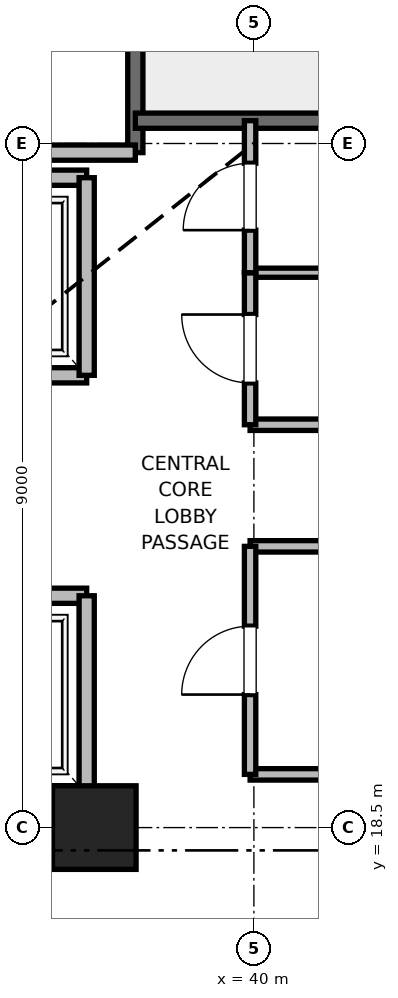
"""IFC4 building model, lengths in metres.
Left out: names, types, materials, properties, quantities, classifications, styles, units other than length and angle.
Written with IfcOpenShell. Run it as: python <this file> out.ifc"""

import sys

from ifc_helpers import new_model, si_unit, direction, frame, frame_2d, origin, origin_2d, place, context, subcontext, project, spatial, rectangle, extrude, element, fill, save


model = new_model("IFC4")
c1 = context("Model", 3, precision=1e-05, world=origin(), true_north=direction((0.0, 1.0)))
c2 = subcontext(c1, "Body", "Model", "MODEL_VIEW")
j1 = project(units=[si_unit("LENGTHUNIT", "METRE"), si_unit("PLANEANGLEUNIT", "RADIAN")], contexts=[c1])
p1 = place(None, origin())
s1 = spatial("IfcSite", under=j1, at=p1, CompositionType="ELEMENT")
p2 = place(p1, origin())
s2 = spatial("IfcBuilding", under=s1, at=p2, CompositionType="ELEMENT")
p3 = place(p2, frame((0.0, 0.0, 107.6)))
s3 = spatial("IfcBuildingStorey", under=s2, at=p3, CompositionType="ELEMENT", Elevation=107.6)
p4 = place(p3, frame((37.9, 18.5, 0.0), z_axis=(0.0, 0.0, 1.0), x_axis=(1.0, 0.0, 0.0)))
e1 = element("IfcColumn", 1, at=p4, inside=s3, PredefinedType="PILASTER", context=c2, shape_type="SweptSolid", body=[
    extrude(rectangle(XDim=1.1, YDim=1.1, at=origin_2d()), origin(), (0.0, 0.0, 1.0), 5.4),
])
p5 = place(p3, frame((29.0, 18.5, 0.0), z_axis=(0.0, 0.0, 1.0), x_axis=(1.0, 0.0, 0.0)))
e2 = element("IfcWall", 2, at=p5, inside=s3, PredefinedType="SHEAR", context=c2, shape_type="SweptSolid", body=[
    extrude(rectangle(XDim=9.2, YDim=0.65, at=frame_2d((4.6, 0.0))), origin(), (0.0, 0.0, 1.0), 5.1),
])
p6 = place(p3, frame((38.44, 27.38, 0.0), z_axis=(0.0, 0.0, 1.0), x_axis=(0.0, 1.0, 0.0)))
e3 = element("IfcWall", 3, at=p6, inside=s3, PredefinedType="SOLIDWALL", context=c2, shape_type="SweptSolid", body=[
    extrude(rectangle(XDim=8.87, YDim=0.2, at=frame_2d((4.435, 0.0))), origin(), (0.0, 0.0, 1.0), 5.1),
])
p7 = place(p3, frame((38.44, 27.8, 0.0), z_axis=(0.0, 0.0, 1.0), x_axis=(1.0, 0.0, 0.0)))
e4 = element("IfcWall", 4, at=p7, inside=s3, PredefinedType="SOLIDWALL", context=c2, shape_type="SweptSolid", body=[
    extrude(rectangle(XDim=3.32, YDim=0.2, at=frame_2d((1.66, 0.0))), origin(), (0.0, 0.0, 1.0), 5.1),
])
p8 = place(p3, frame((32.82, 27.38, 0.0), z_axis=(0.0, 0.0, 1.0), x_axis=(1.0, 0.0, 0.0)))
e5 = element("IfcWall", 5, at=p8, inside=s3, PredefinedType="PARTITIONING", context=c2, shape_type="SweptSolid", body=[
    extrude(rectangle(XDim=5.62, YDim=0.2, at=frame_2d((2.81, 0.0))), origin(), (0.0, 0.0, 1.0), 5.1),
])
p9 = place(p3, frame((35.5, 18.95, 0.0), z_axis=(0.0, 0.0, 1.0), x_axis=(1.0, 0.0, 0.0)))
e6 = element("IfcWall", 6, at=p9, inside=s3, PredefinedType="SOLIDWALL", context=c2, shape_type="SweptSolid", body=[
    extrude(rectangle(XDim=2.3, YDim=0.2, at=frame_2d((1.15, 0.0))), origin(), (0.0, 0.0, 1.0), 3.88),
])
p10 = place(p3, frame((37.8, 21.55, 0.0), z_axis=(0.0, 0.0, 1.0), x_axis=(-1.0, 0.0, 0.0)))
e7 = element("IfcWall", 7, at=p10, inside=s3, PredefinedType="SOLIDWALL", context=c2, shape_type="SweptSolid", body=[
    extrude(rectangle(XDim=2.3, YDim=0.2, at=frame_2d((1.15, 0.0))), origin(), (0.0, 0.0, 1.0), 5.1),
])
p11 = place(p10, frame((0.6, 0.0, 0.0)))
e8 = element("IfcOpeningElement", 8, at=p11, cuts=e7, PredefinedType="OPENING", context=c2, shape_type="SweptSolid", body=[
    extrude(rectangle(XDim=1.1, YDim=2.2, at=frame_2d((0.55, 1.1))), frame((0.0, 0.1, 0.0), z_axis=(0.0, -1.0, 0.0), x_axis=(1.0, 0.0, 0.0)), (0.0, 0.0, 1.0), 0.2),
])
p12 = place(p3, frame((37.8, 18.95, 0.0), z_axis=(0.0, 0.0, 1.0), x_axis=(0.0, 1.0, 0.0)))
e9 = element("IfcWall", 9, at=p12, inside=s3, PredefinedType="SOLIDWALL", context=c2, shape_type="SweptSolid", body=[
    extrude(rectangle(XDim=2.6, YDim=0.2, at=frame_2d((1.3, 0.0))), origin(), (0.0, 0.0, 1.0), 3.88),
])
p13 = place(p3, frame((35.5, 24.45, 0.0), z_axis=(0.0, 0.0, 1.0), x_axis=(1.0, 0.0, 0.0)))
e10 = element("IfcWall", 10, at=p13, inside=s3, PredefinedType="SOLIDWALL", context=c2, shape_type="SweptSolid", body=[
    extrude(rectangle(XDim=2.3, YDim=0.2, at=frame_2d((1.15, 0.0))), origin(), (0.0, 0.0, 1.0), 5.1),
])
p14 = place(p13, frame((0.6, 0.0, 0.0)))
e11 = element("IfcOpeningElement", 11, at=p14, cuts=e10, PredefinedType="OPENING", context=c2, shape_type="SweptSolid", body=[
    extrude(rectangle(XDim=1.1, YDim=2.2, at=frame_2d((0.55, 1.1))), frame((0.0, 0.1, 0.0), z_axis=(0.0, -1.0, 0.0), x_axis=(1.0, 0.0, 0.0)), (0.0, 0.0, 1.0), 0.2),
])
p15 = place(p3, frame((37.8, 27.05, 0.0), z_axis=(0.0, 0.0, 1.0), x_axis=(-1.0, 0.0, 0.0)))
e12 = element("IfcWall", 12, at=p15, inside=s3, PredefinedType="SOLIDWALL", context=c2, shape_type="SweptSolid", body=[
    extrude(rectangle(XDim=2.3, YDim=0.2, at=frame_2d((1.15, 0.0))), origin(), (0.0, 0.0, 1.0), 5.1),
])
p16 = place(p3, frame((37.8, 24.45, 0.0), z_axis=(0.0, 0.0, 1.0), x_axis=(0.0, 1.0, 0.0)))
e13 = element("IfcWall", 13, at=p16, inside=s3, PredefinedType="SOLIDWALL", context=c2, shape_type="SweptSolid", body=[
    extrude(rectangle(XDim=2.6, YDim=0.2, at=frame_2d((1.3, 0.0))), origin(), (0.0, 0.0, 1.0), 5.1),
])
for number, where, z_axis, x_axis in (
    (14, (39.95, 19.2, 0.0), (0.0, 0.0, 1.0), (1.0, 0.0, 0.0)),
    (15, (39.95, 22.2, 0.0), (0.0, 0.0, 1.0), (1.0, 0.0, 0.0)),
    (16, (39.95, 23.8, 0.0), (0.0, 0.0, 1.0), (1.0, 0.0, 0.0)),
):
    element("IfcWall", number, at=place(p3, frame(where, z_axis=z_axis, x_axis=x_axis)), inside=s3, PredefinedType="PARTITIONING", context=c2, shape_type="SweptSolid", body=[
        extrude(rectangle(XDim=1.81, YDim=0.15, at=frame_2d((0.905, 0.0))), origin(), (0.0, 0.0, 1.0), 2.85),
    ])
p17 = place(p3, frame((39.95, 25.8, 0.0), z_axis=(0.0, 0.0, 1.0), x_axis=(1.0, 0.0, 0.0)))
e17 = element("IfcWall", 17, at=p17, inside=s3, PredefinedType="PARTITIONING", context=c2, shape_type="SweptSolid", body=[
    extrude(rectangle(XDim=1.81, YDim=0.12, at=frame_2d((0.905, 0.0))), origin(), (0.0, 0.0, 1.0), 2.85),
])
p18 = place(p3, frame((39.95, 19.2, 0.0), z_axis=(0.0, 0.0, 1.0), x_axis=(0.0, 1.0, 0.0)))
e18 = element("IfcWall", 18, at=p18, inside=s3, PredefinedType="PARTITIONING", context=c2, shape_type="SweptSolid", body=[
    extrude(rectangle(XDim=3.0, YDim=0.15, at=frame_2d((1.5, 0.0))), origin(), (0.0, 0.0, 1.0), 2.85),
])
p19 = place(p18, frame((1.05, 0.0, 0.0)))
e19 = element("IfcOpeningElement", 19, at=p19, cuts=e18, PredefinedType="OPENING", context=c2, shape_type="SweptSolid", body=[
    extrude(rectangle(XDim=0.9, YDim=2.1, at=frame_2d((0.45, 1.05))), frame((0.0, 0.075, 0.0), z_axis=(0.0, -1.0, 0.0), x_axis=(1.0, 0.0, 0.0)), (0.0, 0.0, 1.0), 0.15),
])
p20 = place(p3, frame((39.95, 23.8, 0.0), z_axis=(0.0, 0.0, 1.0), x_axis=(0.0, 1.0, 0.0)))
e20 = element("IfcWall", 20, at=p20, inside=s3, PredefinedType="PARTITIONING", context=c2, shape_type="SweptSolid", body=[
    extrude(rectangle(XDim=2.0, YDim=0.15, at=frame_2d((1.0, 0.0))), origin(), (0.0, 0.0, 1.0), 2.85),
])
p21 = place(p20, frame((0.55, 0.0, 0.0)))
e21 = element("IfcOpeningElement", 21, at=p21, cuts=e20, PredefinedType="OPENING", context=c2, shape_type="SweptSolid", body=[
    extrude(rectangle(XDim=0.9, YDim=2.1, at=frame_2d((0.45, 1.05))), frame((0.0, 0.075, 0.0), z_axis=(0.0, -1.0, 0.0), x_axis=(1.0, 0.0, 0.0)), (0.0, 0.0, 1.0), 0.15),
])
p22 = place(p3, frame((39.95, 25.8, 0.0), z_axis=(0.0, 0.0, 1.0), x_axis=(0.0, 1.0, 0.0)))
e22 = element("IfcWall", 22, at=p22, inside=s3, PredefinedType="PARTITIONING", context=c2, shape_type="SweptSolid", body=[
    extrude(rectangle(XDim=2.0, YDim=0.15, at=frame_2d((1.0, 0.0))), origin(), (0.0, 0.0, 1.0), 2.85),
])
p23 = place(p22, frame((0.56, 0.0, 0.0)))
e23 = element("IfcOpeningElement", 23, at=p23, cuts=e22, PredefinedType="OPENING", context=c2, shape_type="SweptSolid", body=[
    extrude(rectangle(XDim=0.88, YDim=2.1, at=frame_2d((0.44, 1.05))), frame((0.0, 0.075, 0.0), z_axis=(0.0, -1.0, 0.0), x_axis=(1.0, 0.0, 0.0)), (0.0, 0.0, 1.0), 0.15),
])
p24 = place(p19, origin())
e24 = element("IfcDoor", 24, at=p24, inside=s3, OperationType="SINGLE_SWING_LEFT", PredefinedType="DOOR", context=c2, shape_type="SweptSolid", body=[
    extrude(rectangle(XDim=0.9, YDim=2.1, at=frame_2d((0.45, 1.05))), frame((0.0, 0.025, 0.0), z_axis=(0.0, -1.0, 0.0), x_axis=(1.0, 0.0, 0.0)), (0.0, 0.0, 1.0), 0.05),
])
fill(e19, e24)
p25 = place(p21, origin())
e25 = element("IfcDoor", 25, at=p25, inside=s3, OperationType="SINGLE_SWING_RIGHT", PredefinedType="DOOR", context=c2, shape_type="SweptSolid", body=[
    extrude(rectangle(XDim=0.9, YDim=2.1, at=frame_2d((0.45, 1.05))), frame((0.0, 0.025, 0.0), z_axis=(0.0, -1.0, 0.0), x_axis=(1.0, 0.0, 0.0)), (0.0, 0.0, 1.0), 0.05),
])
fill(e21, e25)
p26 = place(p23, origin())
e26 = element("IfcDoor", 26, at=p26, inside=s3, OperationType="SINGLE_SWING_LEFT", PredefinedType="DOOR", context=c2, shape_type="SweptSolid", body=[
    extrude(rectangle(XDim=0.88, YDim=2.1, at=frame_2d((0.44, 1.05))), frame((0.0, 0.025, 0.0), z_axis=(0.0, -1.0, 0.0), x_axis=(1.0, 0.0, 0.0)), (0.0, 0.0, 1.0), 0.05),
])
fill(e23, e26)
save(model, sys.argv[1])
